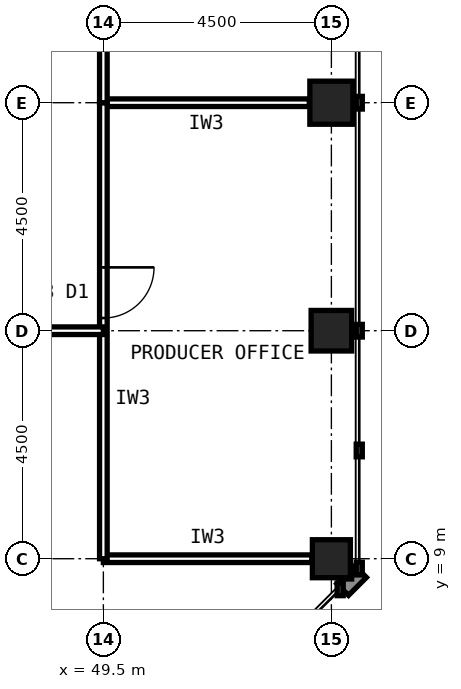
"""IFC4 building model, lengths in metres.
Left out: names, types, materials, properties, quantities, classifications, styles, units other than length and angle.
Written with IfcOpenShell. Run it as: python <this file> out.ifc"""

import sys

from ifc_helpers import new_model, si_unit, direction, frame, frame_2d, origin, origin_2d, place, context, subcontext, project, spatial, rectangle, hollow_rectangle, extrude, element, fill, save


model = new_model("IFC4")
c1 = context("Model", 3, precision=1e-05, world=origin(), true_north=direction((0.0, 1.0)))
c2 = subcontext(c1, "Body", "Model", "MODEL_VIEW")
j1 = project(units=[si_unit("LENGTHUNIT", "METRE"), si_unit("PLANEANGLEUNIT", "RADIAN")], contexts=[c1])
p1 = place(None, origin())
s1 = spatial("IfcSite", under=j1, at=p1, CompositionType="ELEMENT")
p2 = place(p1, origin())
s2 = spatial("IfcBuilding", under=s1, at=p2, CompositionType="ELEMENT")
p3 = place(p2, frame((0.0, 0.0, 135.6)))
s3 = spatial("IfcBuildingStorey", under=s2, at=p3, CompositionType="ELEMENT", Elevation=135.6)
p4 = place(p3, frame((54.0, 9.0, 0.0), z_axis=(0.0, 0.0, 1.0), x_axis=(1.0, 0.0, 0.0)))
e1 = element("IfcColumn", 1, at=p4, inside=s3, PredefinedType="COLUMN", context=c2, shape_type="SweptSolid", body=[
    extrude(hollow_rectangle(XDim=0.75, YDim=0.75, WallThickness=0.04, at=origin_2d()), origin(), (0.0, 0.0, 1.0), 4.0),
])
p5 = place(p3, frame((54.0, 13.5, 0.0), z_axis=(0.0, 0.0, 1.0), x_axis=(1.0, 0.0, 0.0)))
e2 = element("IfcColumn", 2, at=p5, inside=s3, PredefinedType="COLUMN", context=c2, shape_type="SweptSolid", body=[
    extrude(hollow_rectangle(XDim=0.8, YDim=0.8, WallThickness=0.045, at=origin_2d()), origin(), (0.0, 0.0, 1.0), 4.0),
])
p6 = place(p3, frame((54.0, 18.0, 0.0), z_axis=(0.0, 0.0, 1.0), x_axis=(1.0, 0.0, 0.0)))
e3 = element("IfcColumn", 3, at=p6, inside=s3, PredefinedType="COLUMN", context=c2, shape_type="SweptSolid", body=[
    extrude(hollow_rectangle(XDim=0.85, YDim=0.85, WallThickness=0.05, at=origin_2d()), origin(), (0.0, 0.0, 1.0), 4.0),
])
p7 = place(p3, frame((49.5, 9.0, 0.0), z_axis=(0.0, 0.0, 1.0), x_axis=(1.0, 0.0, 0.0)))
e4 = element("IfcWall", 4, at=p7, inside=s3, PredefinedType="PARTITIONING", context=c2, shape_type="SweptSolid", body=[
    extrude(rectangle(XDim=4.115, YDim=0.15, at=frame_2d((2.058, 0.0))), origin(), (0.0, 0.0, 1.0), 3.229),
])
p8 = place(p3, frame((53.565, 18.0, 0.0), z_axis=(0.0, 0.0, 1.0), x_axis=(-1.0, 0.0, 0.0)))
e5 = element("IfcWall", 5, at=p8, inside=s3, PredefinedType="PARTITIONING", context=c2, shape_type="SweptSolid", body=[
    extrude(rectangle(XDim=4.065, YDim=0.15, at=frame_2d((2.032, 0.0))), origin(), (0.0, 0.0, 1.0), 2.989),
])
p9 = place(p3, frame((49.5, 18.0, 0.0), z_axis=(0.0, 0.0, 1.0), x_axis=(0.0, -1.0, 0.0)))
e6 = element("IfcWall", 6, at=p9, inside=s3, PredefinedType="PARTITIONING", context=c2, shape_type="SweptSolid", body=[
    extrude(rectangle(XDim=9.0, YDim=0.15, at=frame_2d((4.5, 0.0))), origin(), (0.0, 0.0, 1.0), 3.84),
])
p10 = place(p9, frame((3.25, 0.0, 0.0)))
e7 = element("IfcOpeningElement", 7, at=p10, cuts=e6, PredefinedType="OPENING", context=c2, shape_type="SweptSolid", body=[
    extrude(rectangle(XDim=1.0, YDim=2.1, at=frame_2d((0.5, 1.05))), frame((0.0, 0.085, 0.0), z_axis=(0.0, -1.0, 0.0), x_axis=(1.0, 0.0, 0.0)), (0.0, 0.0, 1.0), 0.17),
])
p11 = place(p3, frame((49.5, 27.0, 0.0), z_axis=(0.0, 0.0, 1.0), x_axis=(0.0, -1.0, 0.0)))
e8 = element("IfcWall", 8, at=p11, inside=s3, PredefinedType="PARTITIONING", context=c2, shape_type="SweptSolid", body=[
    extrude(rectangle(XDim=9.0, YDim=0.15, at=frame_2d((4.5, 0.0))), origin(), (0.0, 0.0, 1.0), 3.84),
])
p12 = place(p11, frame((4.0, 0.0, 0.0)))
e9 = element("IfcOpeningElement", 9, at=p12, cuts=e8, PredefinedType="OPENING", context=c2, shape_type="SweptSolid", body=[
    extrude(rectangle(XDim=1.0, YDim=2.1, at=frame_2d((0.5, 1.05))), frame((0.0, 0.085, 0.0), z_axis=(0.0, -1.0, 0.0), x_axis=(1.0, 0.0, 0.0)), (0.0, 0.0, 1.0), 0.17),
])
p13 = place(p3, frame((49.5, 13.5, 0.0), z_axis=(0.0, 0.0, 1.0), x_axis=(-1.0, 0.0, 0.0)))
e10 = element("IfcWall", 10, at=p13, inside=s3, PredefinedType="PARTITIONING", context=c2, shape_type="SweptSolid", body=[
    extrude(rectangle(XDim=7.2, YDim=0.15, at=frame_2d((3.6, 0.0))), origin(), (0.0, 0.0, 1.0), 2.989),
])
p14 = place(p13, frame((3.1, 0.0, 0.0)))
e11 = element("IfcOpeningElement", 11, at=p14, cuts=e10, PredefinedType="OPENING", context=c2, shape_type="SweptSolid", body=[
    extrude(rectangle(XDim=1.0, YDim=2.1, at=frame_2d((0.5, 1.05))), frame((0.0, 0.085, 0.0), z_axis=(0.0, -1.0, 0.0), x_axis=(1.0, 0.0, 0.0)), (0.0, 0.0, 1.0), 0.17),
])
p15 = place(p10, origin())
e12 = element("IfcDoor", 12, at=p15, inside=s3, OperationType="SINGLE_SWING_LEFT", PredefinedType="DOOR", context=c2, shape_type="SweptSolid", body=[
    extrude(rectangle(XDim=1.0, YDim=2.1, at=frame_2d((0.5, 1.05))), frame((0.0, 0.025, 0.0), z_axis=(0.0, -1.0, 0.0), x_axis=(1.0, 0.0, 0.0)), (0.0, 0.0, 1.0), 0.05),
])
fill(e7, e12)
save(model, sys.argv[1])
